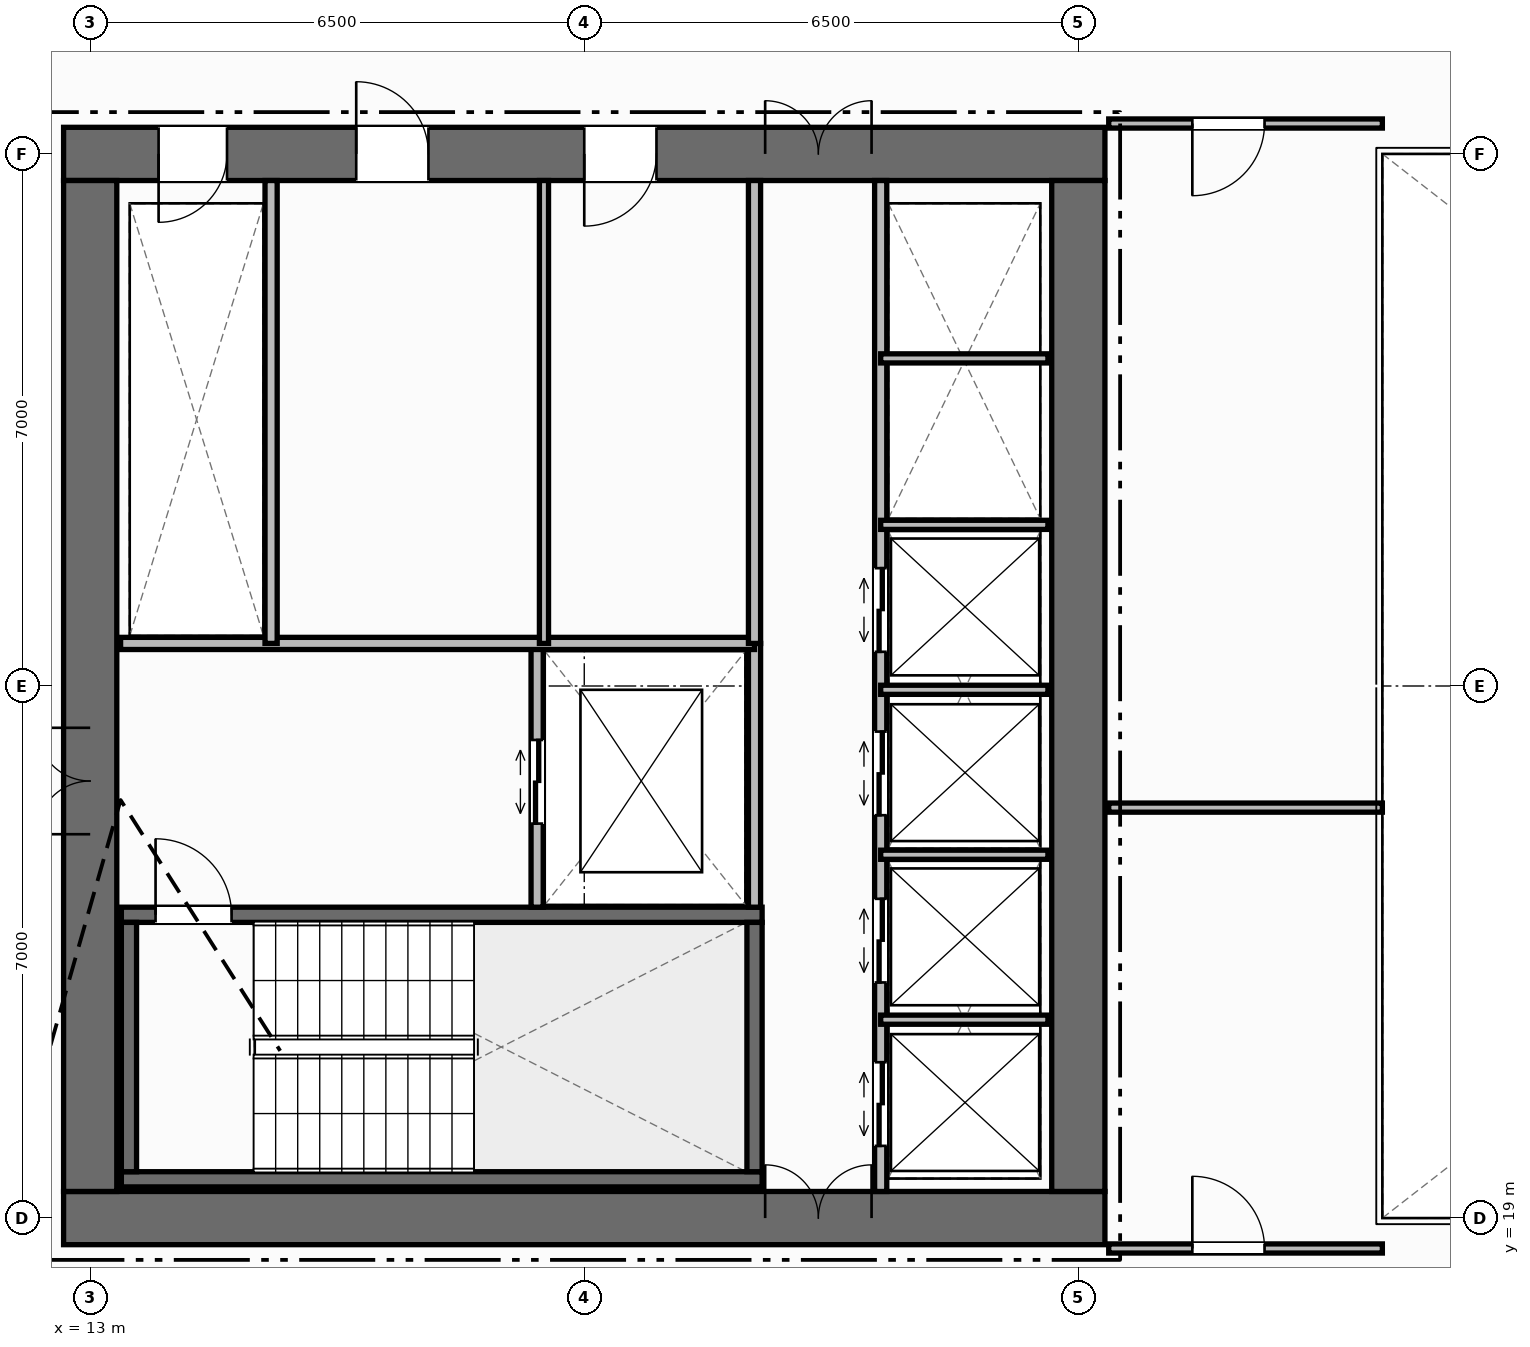
"""IFC4 building model, lengths in metres.
Left out: names, types, materials, properties, quantities, classifications, styles, units other than length and angle.
Written with IfcOpenShell. Run it as: python <this file> out.ifc"""

import sys

from ifc_helpers import new_model, si_unit, direction, frame, frame_2d, origin, place, context, subcontext, project, spatial, rectangle, extrude, element, fill, save


model = new_model("IFC4")
c1 = context("Model", 3, precision=1e-05, world=origin(), true_north=direction((0.0, 1.0)))
c2 = subcontext(c1, "Body", "Model", "MODEL_VIEW")
j1 = project(units=[si_unit("LENGTHUNIT", "METRE"), si_unit("PLANEANGLEUNIT", "RADIAN")], contexts=[c1])
p1 = place(None, origin())
s1 = spatial("IfcSite", under=j1, at=p1, CompositionType="ELEMENT")
p2 = place(p1, origin())
s2 = spatial("IfcBuilding", under=s1, at=p2, CompositionType="ELEMENT")
p3 = place(p2, frame((0.0, 0.0, 86.0)))
s3 = spatial("IfcBuildingStorey", under=s2, at=p3, CompositionType="ELEMENT", Elevation=86.0)
p4 = place(p3, frame((12.65, 19.0, 0.0), z_axis=(0.0, 0.0, 1.0), x_axis=(1.0, 0.0, 0.0)))
e1 = element("IfcWall", 1, at=p4, inside=s3, PredefinedType="SHEAR", context=c2, shape_type="SweptSolid", body=[
    extrude(rectangle(XDim=13.7, YDim=0.7, at=frame_2d((6.85, 0.0))), origin(), (0.0, 0.0, 1.0), 3.8),
])
p5 = place(p4, frame((9.23, 0.0, 0.0)))
e2 = element("IfcOpeningElement", 2, at=p5, cuts=e1, PredefinedType="OPENING", context=c2, shape_type="SweptSolid", body=[
    extrude(rectangle(XDim=1.4, YDim=2.2, at=frame_2d((0.7, 1.1))), frame((0.0, 0.36, 0.0), z_axis=(0.0, -1.0, 0.0), x_axis=(1.0, 0.0, 0.0)), (0.0, 0.0, 1.0), 0.72),
])
p6 = place(p3, frame((12.65, 33.0, 0.0), z_axis=(0.0, 0.0, 1.0), x_axis=(1.0, 0.0, 0.0)))
e3 = element("IfcWall", 3, at=p6, inside=s3, PredefinedType="SHEAR", context=c2, shape_type="SweptSolid", body=[
    extrude(rectangle(XDim=13.7, YDim=0.7, at=frame_2d((6.85, 0.0))), origin(), (0.0, 0.0, 1.0), 3.8),
])
p7 = place(p6, frame((1.25, 0.0, 0.0)))
e4 = element("IfcOpeningElement", 4, at=p7, cuts=e3, PredefinedType="OPENING", context=c2, shape_type="SweptSolid", body=[
    extrude(rectangle(XDim=0.9, YDim=2.15, at=frame_2d((0.45, 1.075))), frame((0.0, 0.36, 0.0), z_axis=(0.0, -1.0, 0.0), x_axis=(1.0, 0.0, 0.0)), (0.0, 0.0, 1.0), 0.72),
])
p8 = place(p6, frame((3.85, 0.0, 0.0)))
e5 = element("IfcOpeningElement", 5, at=p8, cuts=e3, PredefinedType="OPENING", context=c2, shape_type="SweptSolid", body=[
    extrude(rectangle(XDim=0.95, YDim=2.15, at=frame_2d((0.475, 1.075))), frame((0.0, 0.36, 0.0), z_axis=(0.0, -1.0, 0.0), x_axis=(1.0, 0.0, 0.0)), (0.0, 0.0, 1.0), 0.72),
])
p9 = place(p6, frame((6.85, 0.0, 0.0)))
e6 = element("IfcOpeningElement", 6, at=p9, cuts=e3, PredefinedType="OPENING", context=c2, shape_type="SweptSolid", body=[
    extrude(rectangle(XDim=0.95, YDim=2.15, at=frame_2d((0.475, 1.075))), frame((0.0, 0.36, 0.0), z_axis=(0.0, -1.0, 0.0), x_axis=(1.0, 0.0, 0.0)), (0.0, 0.0, 1.0), 0.72),
])
p10 = place(p6, frame((9.23, 0.0, 0.0)))
e7 = element("IfcOpeningElement", 7, at=p10, cuts=e3, PredefinedType="OPENING", context=c2, shape_type="SweptSolid", body=[
    extrude(rectangle(XDim=1.4, YDim=2.2, at=frame_2d((0.7, 1.1))), frame((0.0, 0.36, 0.0), z_axis=(0.0, -1.0, 0.0), x_axis=(1.0, 0.0, 0.0)), (0.0, 0.0, 1.0), 0.72),
])
p11 = place(p3, frame((13.0, 19.35, 0.0), z_axis=(0.0, 0.0, 1.0), x_axis=(0.0, 1.0, 0.0)))
e8 = element("IfcWall", 8, at=p11, inside=s3, PredefinedType="SHEAR", context=c2, shape_type="SweptSolid", body=[
    extrude(rectangle(XDim=13.3, YDim=0.7, at=frame_2d((6.65, 0.0))), origin(), (0.0, 0.0, 1.0), 3.8),
])
p12 = place(p11, frame((4.7, 0.0, 0.0)))
e9 = element("IfcOpeningElement", 9, at=p12, cuts=e8, PredefinedType="OPENING", context=c2, shape_type="SweptSolid", body=[
    extrude(rectangle(XDim=1.4, YDim=2.2, at=frame_2d((0.7, 1.1))), frame((0.0, 0.36, 0.0), z_axis=(0.0, -1.0, 0.0), x_axis=(1.0, 0.0, 0.0)), (0.0, 0.0, 1.0), 0.72),
])
p13 = place(p3, frame((26.0, 19.35, 0.0), z_axis=(0.0, 0.0, 1.0), x_axis=(0.0, 1.0, 0.0)))
e10 = element("IfcWall", 10, at=p13, inside=s3, PredefinedType="SHEAR", context=c2, shape_type="SweptSolid", body=[
    extrude(rectangle(XDim=13.3, YDim=0.7, at=frame_2d((6.65, 0.0))), origin(), (0.0, 0.0, 1.0), 3.8),
])
p14 = place(p3, frame((13.41, 19.51, 0.0), z_axis=(0.0, 0.0, 1.0), x_axis=(1.0, 0.0, 0.0)))
e11 = element("IfcWall", 11, at=p14, inside=s3, PredefinedType="SHEAR", context=c2, shape_type="SweptSolid", body=[
    extrude(rectangle(XDim=8.43, YDim=0.2, at=frame_2d((4.215, 0.0))), origin(), (0.0, 0.0, 1.0), 3.8),
])
p15 = place(p3, frame((13.41, 22.99, 0.0), z_axis=(0.0, 0.0, 1.0), x_axis=(1.0, 0.0, 0.0)))
e12 = element("IfcWall", 12, at=p15, inside=s3, PredefinedType="SHEAR", context=c2, shape_type="SweptSolid", body=[
    extrude(rectangle(XDim=8.43, YDim=0.2, at=frame_2d((4.215, 0.0))), origin(), (0.0, 0.0, 1.0), 3.8),
])
p16 = place(p15, frame((0.45, 0.0, 0.0)))
e13 = element("IfcOpeningElement", 13, at=p16, cuts=e12, PredefinedType="OPENING", context=c2, shape_type="SweptSolid", body=[
    extrude(rectangle(XDim=1.0, YDim=2.15, at=frame_2d((0.5, 1.075))), frame((0.0, 0.11, 0.0), z_axis=(0.0, -1.0, 0.0), x_axis=(1.0, 0.0, 0.0)), (0.0, 0.0, 1.0), 0.22),
])
for number, where, z_axis, x_axis in (
    (14, (13.51, 19.61, 0.0), (0.0, 0.0, 1.0), (0.0, 1.0, 0.0)),
    (15, (21.74, 19.61, 0.0), (0.0, 0.0, 1.0), (0.0, 1.0, 0.0)),
):
    element("IfcWall", number, at=place(p3, frame(where, z_axis=z_axis, x_axis=x_axis)), inside=s3, PredefinedType="SHEAR", context=c2, shape_type="SweptSolid", body=[
        extrude(rectangle(XDim=3.28, YDim=0.2, at=frame_2d((1.64, 0.0))), origin(), (0.0, 0.0, 1.0), 3.8),
    ])
p17 = place(p3, frame((21.74, 23.09, 0.0), z_axis=(0.0, 0.0, 1.0), x_axis=(0.0, 1.0, 0.0)))
e16 = element("IfcWall", 16, at=p17, inside=s3, PredefinedType="STANDARD", context=c2, shape_type="SweptSolid", body=[
    extrude(rectangle(XDim=3.47, YDim=0.16, at=frame_2d((1.735, 0.0))), origin(), (0.0, 0.0, 1.0), 3.565),
])
p18 = place(p3, frame((18.88, 23.09, 0.0), z_axis=(0.0, 0.0, 1.0), x_axis=(0.0, 1.0, 0.0)))
e17 = element("IfcWall", 17, at=p18, inside=s3, PredefinedType="STANDARD", context=c2, shape_type="SweptSolid", body=[
    extrude(rectangle(XDim=3.47, YDim=0.16, at=frame_2d((1.735, 0.0))), origin(), (0.0, 0.0, 1.0), 3.565),
])
p19 = place(p18, frame((1.1, 0.0, 0.0)))
e18 = element("IfcOpeningElement", 18, at=p19, cuts=e17, PredefinedType="OPENING", context=c2, shape_type="SweptSolid", body=[
    extrude(rectangle(XDim=1.1, YDim=2.2, at=frame_2d((0.55, 1.1))), frame((0.0, 0.09, 0.0), z_axis=(0.0, -1.0, 0.0), x_axis=(1.0, 0.0, 0.0)), (0.0, 0.0, 1.0), 0.18),
])
p20 = place(p3, frame((13.4, 26.56, 0.0), z_axis=(0.0, 0.0, 1.0), x_axis=(1.0, 0.0, 0.0)))
e19 = element("IfcWall", 19, at=p20, inside=s3, PredefinedType="STANDARD", context=c2, shape_type="SweptSolid", body=[
    extrude(rectangle(XDim=8.34, YDim=0.16, at=frame_2d((4.17, 0.0))), origin(), (0.0, 0.0, 1.0), 3.565),
])
p21 = place(p3, frame((15.38, 26.56, 0.0), z_axis=(0.0, 0.0, 1.0), x_axis=(0.0, 1.0, 0.0)))
e20 = element("IfcWall", 20, at=p21, inside=s3, PredefinedType="STANDARD", context=c2, shape_type="SweptSolid", body=[
    extrude(rectangle(XDim=6.09, YDim=0.16, at=frame_2d((3.045, 0.0))), origin(), (0.0, 0.0, 1.0), 3.565),
])
p22 = place(p3, frame((18.97, 26.56, 0.0), z_axis=(0.0, 0.0, 1.0), x_axis=(0.0, 1.0, 0.0)))
e21 = element("IfcWall", 21, at=p22, inside=s3, PredefinedType="PARTITIONING", context=c2, shape_type="SweptSolid", body=[
    extrude(rectangle(XDim=6.09, YDim=0.12, at=frame_2d((3.045, 0.0))), origin(), (0.0, 0.0, 1.0), 3.565),
])
p23 = place(p3, frame((21.74, 26.56, 0.0), z_axis=(0.0, 0.0, 1.0), x_axis=(0.0, 1.0, 0.0)))
e22 = element("IfcWall", 22, at=p23, inside=s3, PredefinedType="STANDARD", context=c2, shape_type="SweptSolid", body=[
    extrude(rectangle(XDim=6.09, YDim=0.16, at=frame_2d((3.045, 0.0))), origin(), (0.0, 0.0, 1.0), 3.565),
])
p24 = place(p3, frame((23.4, 19.35, 0.0), z_axis=(0.0, 0.0, 1.0), x_axis=(0.0, 1.0, 0.0)))
e23 = element("IfcWall", 23, at=p24, inside=s3, PredefinedType="STANDARD", context=c2, shape_type="SweptSolid", body=[
    extrude(rectangle(XDim=13.3, YDim=0.16, at=frame_2d((6.65, 0.0))), origin(), (0.0, 0.0, 1.0), 3.565),
])
p25 = place(p24, frame((0.6, 0.0, 0.0)))
e24 = element("IfcOpeningElement", 24, at=p25, cuts=e23, PredefinedType="OPENING", context=c2, shape_type="SweptSolid", body=[
    extrude(rectangle(XDim=1.1, YDim=2.2, at=frame_2d((0.55, 1.1))), frame((0.0, 0.09, 0.0), z_axis=(0.0, -1.0, 0.0), x_axis=(1.0, 0.0, 0.0)), (0.0, 0.0, 1.0), 0.18),
])
p26 = place(p24, frame((2.75, 0.0, 0.0)))
e25 = element("IfcOpeningElement", 25, at=p26, cuts=e23, PredefinedType="OPENING", context=c2, shape_type="SweptSolid", body=[
    extrude(rectangle(XDim=1.1, YDim=2.2, at=frame_2d((0.55, 1.1))), frame((0.0, 0.09, 0.0), z_axis=(0.0, -1.0, 0.0), x_axis=(1.0, 0.0, 0.0)), (0.0, 0.0, 1.0), 0.18),
])
p27 = place(p24, frame((4.95, 0.0, 0.0)))
e26 = element("IfcOpeningElement", 26, at=p27, cuts=e23, PredefinedType="OPENING", context=c2, shape_type="SweptSolid", body=[
    extrude(rectangle(XDim=1.1, YDim=2.2, at=frame_2d((0.55, 1.1))), frame((0.0, 0.09, 0.0), z_axis=(0.0, -1.0, 0.0), x_axis=(1.0, 0.0, 0.0)), (0.0, 0.0, 1.0), 0.18),
])
p28 = place(p24, frame((7.1, 0.0, 0.0)))
e27 = element("IfcOpeningElement", 27, at=p28, cuts=e23, PredefinedType="OPENING", context=c2, shape_type="SweptSolid", body=[
    extrude(rectangle(XDim=1.1, YDim=2.2, at=frame_2d((0.55, 1.1))), frame((0.0, 0.09, 0.0), z_axis=(0.0, -1.0, 0.0), x_axis=(1.0, 0.0, 0.0)), (0.0, 0.0, 1.0), 0.18),
])
for number, where, z_axis, x_axis in (
    (28, (23.4, 21.61, 0.0), (0.0, 0.0, 1.0), (1.0, 0.0, 0.0)),
    (29, (23.4, 23.78, 0.0), (0.0, 0.0, 1.0), (1.0, 0.0, 0.0)),
    (30, (23.4, 25.95, 0.0), (0.0, 0.0, 1.0), (1.0, 0.0, 0.0)),
    (31, (23.4, 28.12, 0.0), (0.0, 0.0, 1.0), (1.0, 0.0, 0.0)),
    (32, (23.4, 30.31, 0.0), (0.0, 0.0, 1.0), (1.0, 0.0, 0.0)),
):
    element("IfcWall", number, at=place(p3, frame(where, z_axis=z_axis, x_axis=x_axis)), inside=s3, PredefinedType="PARTITIONING", context=c2, shape_type="SweptSolid", body=[
        extrude(rectangle(XDim=2.2, YDim=0.12, at=frame_2d((1.1, 0.0))), origin(), (0.0, 0.0, 1.0), 3.565),
    ])
p29 = place(p3, frame((26.4, 24.4, 0.0), z_axis=(0.0, 0.0, 1.0), x_axis=(1.0, 0.0, 0.0)))
e33 = element("IfcWall", 33, at=p29, inside=s3, PredefinedType="PARTITIONING", context=c2, shape_type="SweptSolid", body=[
    extrude(rectangle(XDim=3.6, YDim=0.12, at=frame_2d((1.8, 0.0))), origin(), (0.0, 0.0, 1.0), 3.565),
])
p30 = place(p3, frame((26.4, 18.6, 0.0), z_axis=(0.0, 0.0, 1.0), x_axis=(1.0, 0.0, 0.0)))
e34 = element("IfcWall", 34, at=p30, inside=s3, PredefinedType="PARTITIONING", context=c2, shape_type="SweptSolid", body=[
    extrude(rectangle(XDim=3.6, YDim=0.12, at=frame_2d((1.8, 0.0))), origin(), (0.0, 0.0, 1.0), 3.565),
])
p31 = place(p30, frame((1.1, 0.0, 0.0)))
e35 = element("IfcOpeningElement", 35, at=p31, cuts=e34, PredefinedType="OPENING", context=c2, shape_type="SweptSolid", body=[
    extrude(rectangle(XDim=0.95, YDim=2.15, at=frame_2d((0.475, 1.075))), frame((0.0, 0.07, 0.0), z_axis=(0.0, -1.0, 0.0), x_axis=(1.0, 0.0, 0.0)), (0.0, 0.0, 1.0), 0.14),
])
p32 = place(p3, frame((26.4, 33.4, 0.0), z_axis=(0.0, 0.0, 1.0), x_axis=(1.0, 0.0, 0.0)))
e36 = element("IfcWall", 36, at=p32, inside=s3, PredefinedType="PARTITIONING", context=c2, shape_type="SweptSolid", body=[
    extrude(rectangle(XDim=3.6, YDim=0.12, at=frame_2d((1.8, 0.0))), origin(), (0.0, 0.0, 1.0), 3.565),
])
p33 = place(p32, frame((1.1, 0.0, 0.0)))
e37 = element("IfcOpeningElement", 37, at=p33, cuts=e36, PredefinedType="OPENING", context=c2, shape_type="SweptSolid", body=[
    extrude(rectangle(XDim=0.95, YDim=2.15, at=frame_2d((0.475, 1.075))), frame((0.0, 0.07, 0.0), z_axis=(0.0, -1.0, 0.0), x_axis=(1.0, 0.0, 0.0)), (0.0, 0.0, 1.0), 0.14),
])
p34 = place(p16, origin())
e38 = element("IfcDoor", 38, at=p34, inside=s3, OperationType="SINGLE_SWING_LEFT", PredefinedType="DOOR", context=c2, shape_type="SweptSolid", body=[
    extrude(rectangle(XDim=1.0, YDim=2.15, at=frame_2d((0.5, 1.075))), frame((0.0, 0.025, 0.0), z_axis=(0.0, -1.0, 0.0), x_axis=(1.0, 0.0, 0.0)), (0.0, 0.0, 1.0), 0.05),
])
fill(e13, e38)
p35 = place(p12, origin())
e39 = element("IfcDoor", 39, at=p35, inside=s3, OperationType="DOUBLE_DOOR_SINGLE_SWING", PredefinedType="DOOR", context=c2, shape_type="SweptSolid", body=[
    extrude(rectangle(XDim=1.4, YDim=2.2, at=frame_2d((0.7, 1.1))), frame((0.0, 0.025, 0.0), z_axis=(0.0, -1.0, 0.0), x_axis=(1.0, 0.0, 0.0)), (0.0, 0.0, 1.0), 0.05),
])
fill(e9, e39)
p36 = place(p19, origin())
e40 = element("IfcDoor", 40, at=p36, inside=s3, OperationType="DOUBLE_DOOR_SLIDING", PredefinedType="DOOR", context=c2, shape_type="SweptSolid", body=[
    extrude(rectangle(XDim=1.1, YDim=2.2, at=frame_2d((0.55, 1.1))), frame((0.0, 0.025, 0.0), z_axis=(0.0, -1.0, 0.0), x_axis=(1.0, 0.0, 0.0)), (0.0, 0.0, 1.0), 0.05),
])
fill(e18, e40)
p37 = place(p7, origin())
e41 = element("IfcDoor", 41, at=p37, inside=s3, OperationType="SINGLE_SWING_RIGHT", PredefinedType="DOOR", context=c2, shape_type="SweptSolid", body=[
    extrude(rectangle(XDim=0.9, YDim=2.15, at=frame_2d((0.45, 1.075))), frame((0.0, -0.075, 0.0), z_axis=(0.0, -1.0, 0.0), x_axis=(1.0, 0.0, 0.0)), (0.0, 0.0, 1.0), 0.05),
])
fill(e4, e41)
p38 = place(p8, origin())
e42 = element("IfcDoor", 42, at=p38, inside=s3, OperationType="SINGLE_SWING_LEFT", PredefinedType="DOOR", context=c2, shape_type="SweptSolid", body=[
    extrude(rectangle(XDim=0.95, YDim=2.15, at=frame_2d((0.475, 1.075))), frame((0.0, -0.075, 0.0), z_axis=(0.0, -1.0, 0.0), x_axis=(1.0, 0.0, 0.0)), (0.0, 0.0, 1.0), 0.05),
])
fill(e5, e42)
p39 = place(p9, origin())
e43 = element("IfcDoor", 43, at=p39, inside=s3, OperationType="SINGLE_SWING_RIGHT", PredefinedType="DOOR", context=c2, shape_type="SweptSolid", body=[
    extrude(rectangle(XDim=0.95, YDim=2.15, at=frame_2d((0.475, 1.075))), frame((0.0, -0.075, 0.0), z_axis=(0.0, -1.0, 0.0), x_axis=(1.0, 0.0, 0.0)), (0.0, 0.0, 1.0), 0.05),
])
fill(e6, e43)
p40 = place(p5, origin())
e44 = element("IfcDoor", 44, at=p40, inside=s3, OperationType="DOUBLE_DOOR_SINGLE_SWING", PredefinedType="DOOR", context=c2, shape_type="SweptSolid", body=[
    extrude(rectangle(XDim=1.4, YDim=2.2, at=frame_2d((0.7, 1.1))), frame((0.0, 0.125, 0.0), z_axis=(0.0, -1.0, 0.0), x_axis=(1.0, 0.0, 0.0)), (0.0, 0.0, 1.0), 0.05),
])
fill(e2, e44)
p41 = place(p10, origin())
e45 = element("IfcDoor", 45, at=p41, inside=s3, OperationType="DOUBLE_DOOR_SINGLE_SWING", PredefinedType="DOOR", context=c2, shape_type="SweptSolid", body=[
    extrude(rectangle(XDim=1.4, YDim=2.2, at=frame_2d((0.7, 1.1))), frame((0.0, -0.075, 0.0), z_axis=(0.0, -1.0, 0.0), x_axis=(1.0, 0.0, 0.0)), (0.0, 0.0, 1.0), 0.05),
])
fill(e7, e45)
p42 = place(p25, origin())
e46 = element("IfcDoor", 46, at=p42, inside=s3, OperationType="DOUBLE_DOOR_SLIDING", PredefinedType="DOOR", context=c2, shape_type="SweptSolid", body=[
    extrude(rectangle(XDim=1.1, YDim=2.2, at=frame_2d((0.55, 1.1))), frame((0.0, 0.025, 0.0), z_axis=(0.0, -1.0, 0.0), x_axis=(1.0, 0.0, 0.0)), (0.0, 0.0, 1.0), 0.05),
])
fill(e24, e46)
p43 = place(p26, origin())
e47 = element("IfcDoor", 47, at=p43, inside=s3, OperationType="DOUBLE_DOOR_SLIDING", PredefinedType="DOOR", context=c2, shape_type="SweptSolid", body=[
    extrude(rectangle(XDim=1.1, YDim=2.2, at=frame_2d((0.55, 1.1))), frame((0.0, 0.025, 0.0), z_axis=(0.0, -1.0, 0.0), x_axis=(1.0, 0.0, 0.0)), (0.0, 0.0, 1.0), 0.05),
])
fill(e25, e47)
p44 = place(p27, origin())
e48 = element("IfcDoor", 48, at=p44, inside=s3, OperationType="DOUBLE_DOOR_SLIDING", PredefinedType="DOOR", context=c2, shape_type="SweptSolid", body=[
    extrude(rectangle(XDim=1.1, YDim=2.2, at=frame_2d((0.55, 1.1))), frame((0.0, 0.025, 0.0), z_axis=(0.0, -1.0, 0.0), x_axis=(1.0, 0.0, 0.0)), (0.0, 0.0, 1.0), 0.05),
])
fill(e26, e48)
p45 = place(p28, origin())
e49 = element("IfcDoor", 49, at=p45, inside=s3, OperationType="DOUBLE_DOOR_SLIDING", PredefinedType="DOOR", context=c2, shape_type="SweptSolid", body=[
    extrude(rectangle(XDim=1.1, YDim=2.2, at=frame_2d((0.55, 1.1))), frame((0.0, 0.025, 0.0), z_axis=(0.0, -1.0, 0.0), x_axis=(1.0, 0.0, 0.0)), (0.0, 0.0, 1.0), 0.05),
])
fill(e27, e49)
p46 = place(p31, origin())
e50 = element("IfcDoor", 50, at=p46, inside=s3, OperationType="SINGLE_SWING_LEFT", PredefinedType="DOOR", context=c2, shape_type="SweptSolid", body=[
    extrude(rectangle(XDim=0.95, YDim=2.15, at=frame_2d((0.475, 1.075))), frame((0.0, 0.025, 0.0), z_axis=(0.0, -1.0, 0.0), x_axis=(1.0, 0.0, 0.0)), (0.0, 0.0, 1.0), 0.05),
])
fill(e35, e50)
p47 = place(p33, origin())
e51 = element("IfcDoor", 51, at=p47, inside=s3, OperationType="SINGLE_SWING_RIGHT", PredefinedType="DOOR", context=c2, shape_type="SweptSolid", body=[
    extrude(rectangle(XDim=0.95, YDim=2.15, at=frame_2d((0.475, 1.075))), frame((0.0, 0.025, 0.0), z_axis=(0.0, -1.0, 0.0), x_axis=(1.0, 0.0, 0.0)), (0.0, 0.0, 1.0), 0.05),
])
fill(e37, e51)
save(model, sys.argv[1])
